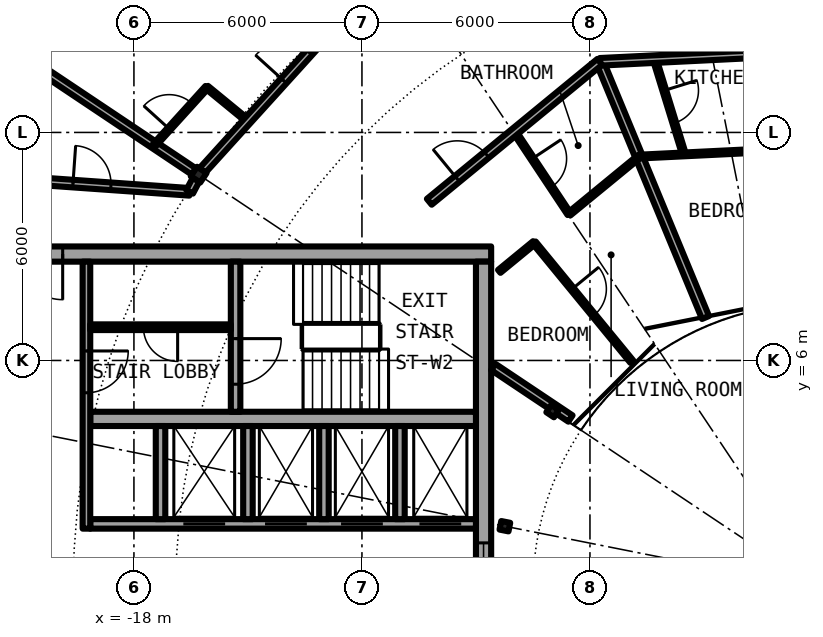
"""IFC4 building model, lengths in metres.
Left out: names, types, materials, properties, quantities, classifications, styles, units other than length and angle.
Written with IfcOpenShell. Run it as: python <this file> out.ifc"""

import sys

from ifc_helpers import new_model, si_unit, direction, frame, frame_2d, origin, origin_2d, place, context, subcontext, project, spatial, rectangle, i_section, extrude, element, fill, save


model = new_model("IFC4")
c1 = context("Model", 3, precision=1e-05, world=origin(), true_north=direction((0.0, 1.0)))
c2 = subcontext(c1, "Body", "Model", "MODEL_VIEW")
j1 = project(units=[si_unit("LENGTHUNIT", "METRE"), si_unit("PLANEANGLEUNIT", "RADIAN")], contexts=[c1])
p1 = place(None, origin())
s1 = spatial("IfcSite", under=j1, at=p1, CompositionType="ELEMENT")
p2 = place(p1, origin())
s2 = spatial("IfcBuilding", under=s1, at=p2, CompositionType="ELEMENT")
p3 = place(p2, frame((0.0, 0.0, 237.1)))
s3 = spatial("IfcBuildingStorey", under=s2, at=p3, CompositionType="ELEMENT", Elevation=237.1)
p4 = place(p3, frame((-16.297, 10.889, 0.0), z_axis=(0.0, 0.0, 1.0), x_axis=(-0.831469612303, 0.55557023302, 0.0)))
e1 = element("IfcColumn", 1, at=p4, inside=s3, PredefinedType="COLUMN", context=c2, shape_type="SweptSolid", body=[
    extrude(i_section(OverallWidth=0.3, OverallDepth=0.3, WebThickness=0.011, FlangeThickness=0.019, FilletRadius=0.027, at=origin_2d()), origin(), (0.0, 0.0, 1.0), 3.05),
])
for number, where, z_axis, x_axis in (
    (2, (-6.984, 4.667, 0.0), (0.0, 0.0, 1.0), (-0.831, 0.556, 0.0)),
    (3, (-8.239, 1.639, 0.0), (0.0, 0.0, 1.0), (-0.981, 0.195, 0.0)),
):
    element("IfcColumn", number, at=place(p3, frame(where, z_axis=z_axis, x_axis=x_axis)), inside=s3, PredefinedType="COLUMN", context=c2, shape_type="SweptSolid", body=[
        extrude(i_section(OverallWidth=0.24, OverallDepth=0.23, WebThickness=0.008, FlangeThickness=0.012, FilletRadius=0.021, at=origin_2d()), origin(), (0.0, 0.0, 1.0), 3.05),
    ])
p5 = place(p3, frame((-8.6, 8.8, 0.0), z_axis=(0.0, 0.0, 1.0), x_axis=(-1.0, 0.0, 0.0)))
e4 = element("IfcWall", 4, at=p5, inside=s3, PredefinedType="SHEAR", context=c2, shape_type="SweptSolid", body=[
    extrude(rectangle(XDim=13.4, YDim=0.4, at=frame_2d((6.7, 0.0))), origin(), (0.0, 0.0, 1.0), 3.05),
])
p6 = place(p5, frame((11.275, 0.0, 0.0)))
e5 = element("IfcOpeningElement", 5, at=p6, cuts=e4, PredefinedType="OPENING", context=c2, shape_type="SweptSolid", body=[
    extrude(rectangle(XDim=1.2, YDim=2.3, at=frame_2d((0.6, 1.15))), frame((0.0, 0.21, 0.0), z_axis=(0.0, -1.0, 0.0), x_axis=(1.0, 0.0, 0.0)), (0.0, 0.0, 1.0), 0.42),
])
p7 = place(p3, frame((-8.8, 8.6, 0.0), z_axis=(0.0, 0.0, 1.0), x_axis=(0.0, -1.0, 0.0)))
e6 = element("IfcWall", 6, at=p7, inside=s3, PredefinedType="SHEAR", context=c2, shape_type="SweptSolid", body=[
    extrude(rectangle(XDim=17.2, YDim=0.4, at=frame_2d((8.6, 0.0))), origin(), (0.0, 0.0, 1.0), 3.05),
])
p8 = place(p7, frame((7.4, 0.0, 0.1)))
e7 = element("IfcOpeningElement", 7, at=p8, cuts=e6, PredefinedType="OPENING", context=c2, shape_type="SweptSolid", body=[
    extrude(rectangle(XDim=2.4, YDim=2.2, at=frame_2d((1.2, 1.1))), frame((0.0, 0.21, 0.0), z_axis=(0.0, -1.0, 0.0), x_axis=(1.0, 0.0, 0.0)), (0.0, 0.0, 1.0), 0.42),
])
p9 = place(p3, frame((-9.0, 1.7, 0.0), z_axis=(0.0, 0.0, 1.0), x_axis=(-1.0, 0.0, 0.0)))
e8 = element("IfcWall", 8, at=p9, inside=s3, PredefinedType="SHEAR", context=c2, shape_type="SweptSolid", body=[
    extrude(rectangle(XDim=10.15, YDim=0.25, at=frame_2d((5.075, 0.0))), origin(), (0.0, 0.0, 1.0), 3.05),
])
p10 = place(p9, frame((0.387, 0.0, 0.0)))
e9 = element("IfcOpeningElement", 9, at=p10, cuts=e8, PredefinedType="OPENING", context=c2, shape_type="SweptSolid", body=[
    extrude(rectangle(XDim=1.1, YDim=2.3, at=frame_2d((0.55, 1.15))), frame((0.0, 0.135, 0.0), z_axis=(0.0, -1.0, 0.0), x_axis=(1.0, 0.0, 0.0)), (0.0, 0.0, 1.0), 0.27),
])
p11 = place(p9, frame((2.45, 0.0, 0.0)))
e10 = element("IfcOpeningElement", 10, at=p11, cuts=e8, PredefinedType="OPENING", context=c2, shape_type="SweptSolid", body=[
    extrude(rectangle(XDim=1.1, YDim=2.3, at=frame_2d((0.55, 1.15))), frame((0.0, 0.135, 0.0), z_axis=(0.0, -1.0, 0.0), x_axis=(1.0, 0.0, 0.0)), (0.0, 0.0, 1.0), 0.27),
])
p12 = place(p9, frame((4.45, 0.0, 0.0)))
e11 = element("IfcOpeningElement", 11, at=p12, cuts=e8, PredefinedType="OPENING", context=c2, shape_type="SweptSolid", body=[
    extrude(rectangle(XDim=1.1, YDim=2.3, at=frame_2d((0.55, 1.15))), frame((0.0, 0.135, 0.0), z_axis=(0.0, -1.0, 0.0), x_axis=(1.0, 0.0, 0.0)), (0.0, 0.0, 1.0), 0.27),
])
p13 = place(p9, frame((6.6, 0.0, 0.0)))
e12 = element("IfcOpeningElement", 12, at=p13, cuts=e8, PredefinedType="OPENING", context=c2, shape_type="SweptSolid", body=[
    extrude(rectangle(XDim=1.1, YDim=2.3, at=frame_2d((0.55, 1.15))), frame((0.0, 0.135, 0.0), z_axis=(0.0, -1.0, 0.0), x_axis=(1.0, 0.0, 0.0)), (0.0, 0.0, 1.0), 0.27),
])
p14 = place(p3, frame((-9.0, 4.462, 0.0), z_axis=(0.0, 0.0, 1.0), x_axis=(-1.0, 0.0, 0.0)))
e13 = element("IfcWall", 13, at=p14, inside=s3, PredefinedType="SHEAR", context=c2, shape_type="SweptSolid", body=[
    extrude(rectangle(XDim=10.15, YDim=0.375, at=frame_2d((5.075, 0.0))), origin(), (0.0, 0.0, 1.0), 3.05),
])
p15 = place(p3, frame((-15.325, 8.6, 0.0), z_axis=(0.0, 0.0, 1.0), x_axis=(0.0, -1.0, 0.0)))
e14 = element("IfcWall", 14, at=p15, inside=s3, PredefinedType="SHEAR", context=c2, shape_type="SweptSolid", body=[
    extrude(rectangle(XDim=3.95, YDim=0.25, at=frame_2d((1.975, 0.0))), origin(), (0.0, 0.0, 1.0), 3.05),
])
p16 = place(p15, frame((2.025, 0.0, 0.0)))
e15 = element("IfcOpeningElement", 15, at=p16, cuts=e14, PredefinedType="OPENING", context=c2, shape_type="SweptSolid", body=[
    extrude(rectangle(XDim=1.2, YDim=2.3, at=frame_2d((0.6, 1.15))), frame((0.0, 0.135, 0.0), z_axis=(0.0, -1.0, 0.0), x_axis=(1.0, 0.0, 0.0)), (0.0, 0.0, 1.0), 0.27),
])
for number, where, z_axis, x_axis in (
    (16, (-15.0, 1.825, 0.0), (0.0, 0.0, 1.0), (0.0, 1.0, 0.0)),
    (17, (-17.3, 1.825, 0.0), (0.0, 0.0, 1.0), (0.0, 1.0, 0.0)),
):
    element("IfcWall", number, at=place(p3, frame(where, z_axis=z_axis, x_axis=x_axis)), inside=s3, PredefinedType="SOLIDWALL", context=c2, shape_type="SweptSolid", body=[
        extrude(rectangle(XDim=2.45, YDim=0.25, at=frame_2d((1.225, 0.0))), origin(), (0.0, 0.0, 1.0), 2.7),
    ])
p17 = place(p3, frame((-19.25, 8.6, 0.0), z_axis=(0.0, 0.0, 1.0), x_axis=(0.0, -1.0, 0.0)))
e18 = element("IfcWall", 18, at=p17, inside=s3, PredefinedType="SOLIDWALL", context=c2, shape_type="SweptSolid", body=[
    extrude(rectangle(XDim=7.025, YDim=0.2, at=frame_2d((3.513, 0.0))), origin(), (0.0, 0.0, 1.0), 2.7),
])
p18 = place(p17, frame((2.35, 0.0, 0.0)))
e19 = element("IfcOpeningElement", 19, at=p18, cuts=e18, PredefinedType="OPENING", context=c2, shape_type="SweptSolid", body=[
    extrude(rectangle(XDim=1.1, YDim=2.3, at=frame_2d((0.55, 1.15))), frame((0.0, 0.11, 0.0), z_axis=(0.0, -1.0, 0.0), x_axis=(1.0, 0.0, 0.0)), (0.0, 0.0, 1.0), 0.22),
])
for number, where, z_axis, x_axis in (
    (20, (-11.0, 1.825, 0.0), (0.0, 0.0, 1.0), (0.0, 1.0, 0.0)),
    (21, (-13.0, 1.825, 0.0), (0.0, 0.0, 1.0), (0.0, 1.0, 0.0)),
):
    element("IfcWall", number, at=place(p3, frame(where, z_axis=z_axis, x_axis=x_axis)), inside=s3, PredefinedType="SOLIDWALL", context=c2, shape_type="SweptSolid", body=[
        extrude(rectangle(XDim=2.45, YDim=0.25, at=frame_2d((1.225, 0.0))), origin(), (0.0, 0.0, 1.0), 2.7),
    ])
p19 = place(p3, frame((-15.45, 6.875, 0.0), z_axis=(0.0, 0.0, 1.0), x_axis=(-1.0, 0.0, 0.0)))
e22 = element("IfcWall", 22, at=p19, inside=s3, PredefinedType="PARTITIONING", context=c2, shape_type="SweptSolid", body=[
    extrude(rectangle(XDim=3.7, YDim=0.15, at=frame_2d((1.85, 0.0))), origin(), (0.0, 0.0, 1.0), 2.7),
])
p20 = place(p19, frame((1.4, 0.0, 0.0)))
e23 = element("IfcOpeningElement", 23, at=p20, cuts=e22, PredefinedType="OPENING", context=c2, shape_type="SweptSolid", body=[
    extrude(rectangle(XDim=0.9, YDim=2.3, at=frame_2d((0.45, 1.15))), frame((0.0, 0.085, 0.0), z_axis=(0.0, -1.0, 0.0), x_axis=(1.0, 0.0, 0.0)), (0.0, 0.0, 1.0), 0.17),
])
p21 = place(p3, frame((-5.742, 13.857, 0.0), z_axis=(0.0, 0.0, 1.0), x_axis=(0.382275765368, -0.924048288355, 0.0)))
e24 = element("IfcWall", 24, at=p21, inside=s3, PredefinedType="PARTITIONING", context=c2, shape_type="SweptSolid", body=[
    extrude(rectangle(XDim=7.28, YDim=0.2, at=frame_2d((3.64, 0.0))), origin(), (0.0, 0.0, 1.0), 2.7),
])
p22 = place(p3, frame((-20.788, 13.89, 0.0), z_axis=(0.0, 0.0, 1.0), x_axis=(0.831406006746, -0.555665413668, 0.0)))
e25 = element("IfcWall", 25, at=p22, inside=s3, PredefinedType="PARTITIONING", context=c2, shape_type="SweptSolid", body=[
    extrude(rectangle(XDim=5.251, YDim=0.2, at=frame_2d((2.625, 0.0))), origin(), (0.0, 0.0, 1.0), 2.7),
])
p23 = place(p3, frame((-16.083, 13.187, 0.0), z_axis=(0.0, 0.0, 1.0), x_axis=(0.773321325714, -0.634014295735, 0.0)))
e26 = element("IfcWall", 26, at=p23, inside=s3, PredefinedType="PARTITIONING", context=c2, shape_type="SweptSolid", body=[
    extrude(rectangle(XDim=1.386, YDim=0.1, at=frame_2d((0.693, 0.0))), origin(), (0.0, 0.0, 1.0), 2.7),
])
p24 = place(p3, frame((-7.984, 12.017, 0.0), z_axis=(0.0, 0.0, 1.0), x_axis=(0.553289146762, -0.832989267683, 0.0)))
e27 = element("IfcWall", 27, at=p24, inside=s3, PredefinedType="PARTITIONING", context=c2, shape_type="SweptSolid", body=[
    extrude(rectangle(XDim=2.597, YDim=0.1, at=frame_2d((1.298, 0.0))), origin(), (0.0, 0.0, 1.0), 2.7),
])
p25 = place(p24, frame((0.848, 0.0, 0.0)))
e28 = element("IfcOpeningElement", 28, at=p25, cuts=e27, PredefinedType="OPENING", context=c2, shape_type="SweptSolid", body=[
    extrude(rectangle(XDim=0.9, YDim=2.3, at=frame_2d((0.45, 1.15))), frame((0.0, 0.06, 0.0), z_axis=(0.0, -1.0, 0.0), x_axis=(1.0, 0.0, 0.0)), (0.0, 0.0, 1.0), 0.12),
])
p26 = place(p3, frame((-7.467, 9.099, 0.0), z_axis=(0.0, 0.0, 1.0), x_axis=(0.634313840507, -0.773075644256, 0.0)))
e29 = element("IfcWall", 29, at=p26, inside=s3, PredefinedType="PARTITIONING", context=c2, shape_type="SweptSolid", body=[
    extrude(rectangle(XDim=4.05, YDim=0.1, at=frame_2d((2.025, 0.0))), origin(), (0.0, 0.0, 1.0), 2.7),
])
p27 = place(p26, frame((1.575, 0.0, 0.0)))
e30 = element("IfcOpeningElement", 30, at=p27, cuts=e29, PredefinedType="OPENING", context=c2, shape_type="SweptSolid", body=[
    extrude(rectangle(XDim=0.9, YDim=2.3, at=frame_2d((0.45, 1.15))), frame((0.0, 0.06, 0.0), z_axis=(0.0, -1.0, 0.0), x_axis=(1.0, 0.0, 0.0)), (0.0, 0.0, 1.0), 0.12),
])
p28 = place(p3, frame((-4.298, 13.929, 0.0), z_axis=(0.0, 0.0, 1.0), x_axis=(0.294733203916, -0.95557958251, 0.0)))
e31 = element("IfcWall", 31, at=p28, inside=s3, PredefinedType="PARTITIONING", context=c2, shape_type="SweptSolid", body=[
    extrude(rectangle(XDim=2.623, YDim=0.1, at=frame_2d((1.312, 0.0))), origin(), (0.0, 0.0, 1.0), 2.7),
])
p29 = place(p28, frame((0.862, 0.0, 0.0)))
e32 = element("IfcOpeningElement", 32, at=p29, cuts=e31, PredefinedType="OPENING", context=c2, shape_type="SweptSolid", body=[
    extrude(rectangle(XDim=0.9, YDim=2.3, at=frame_2d((0.45, 1.15))), frame((0.0, 0.06, 0.0), z_axis=(0.0, -1.0, 0.0), x_axis=(1.0, 0.0, 0.0)), (0.0, 0.0, 1.0), 0.12),
])
p30 = place(p3, frame((-6.513, 4.472, 0.0), z_axis=(0.0, 0.0, 1.0), x_axis=(-0.831450132577, 0.555599385382, 0.0)))
e33 = element("IfcWall", 33, at=p30, inside=s3, PredefinedType="PARTITIONING", context=c2, shape_type="SweptSolid", body=[
    extrude(rectangle(XDim=2.443, YDim=0.2, at=frame_2d((1.221, 0.0))), origin(), (0.0, 0.0, 1.0), 2.7),
])
p31 = place(p3, frame((-21.675, 10.8, 0.0), z_axis=(0.0, 0.0, 1.0), x_axis=(0.997515141784, -0.070452408845, 0.0)))
e34 = element("IfcWall", 34, at=p31, inside=s3, PredefinedType="PARTITIONING", context=c2, shape_type="SweptSolid", body=[
    extrude(rectangle(XDim=5.153, YDim=0.2, at=frame_2d((2.576, 0.0))), origin(), (0.0, 0.0, 1.0), 2.7),
])
p32 = place(p31, frame((2.076, 0.0, 0.0)))
e35 = element("IfcOpeningElement", 35, at=p32, cuts=e34, PredefinedType="OPENING", context=c2, shape_type="SweptSolid", body=[
    extrude(rectangle(XDim=1.0, YDim=2.3, at=frame_2d((0.5, 1.15))), frame((0.0, 0.11, 0.0), z_axis=(0.0, -1.0, 0.0), x_axis=(1.0, 0.0, 0.0)), (0.0, 0.0, 1.0), 0.22),
])
p33 = place(p3, frame((-4.707, 11.364, 0.0), z_axis=(0.0, 0.0, 1.0), x_axis=(0.998798028825, 0.04901527941, 0.0)))
e36 = element("IfcWall", 36, at=p33, inside=s3, PredefinedType="PARTITIONING", context=c2, shape_type="SweptSolid", body=[
    extrude(rectangle(XDim=3.551, YDim=0.1, at=frame_2d((1.776, 0.0))), origin(), (0.0, 0.0, 1.0), 2.7),
])
p34 = place(p3, frame((-8.387, 8.344, 0.0), z_axis=(0.0, 0.0, 1.0), x_axis=(0.772869802794, 0.634564628646, 0.0)))
e37 = element("IfcWall", 37, at=p34, inside=s3, PredefinedType="PARTITIONING", context=c2, shape_type="SweptSolid", body=[
    extrude(rectangle(XDim=1.192, YDim=0.1, at=frame_2d((0.596, 0.0))), origin(), (0.0, 0.0, 1.0), 2.7),
])
p35 = place(p3, frame((-6.547, 9.854, 0.0), z_axis=(0.0, 0.0, 1.0), x_axis=(0.773033390712, 0.634365333893, 0.0)))
e38 = element("IfcWall", 38, at=p35, inside=s3, PredefinedType="PARTITIONING", context=c2, shape_type="SweptSolid", body=[
    extrude(rectangle(XDim=2.38, YDim=0.1, at=frame_2d((1.19, 0.0))), origin(), (0.0, 0.0, 1.0), 2.7),
])
p36 = place(p3, frame((-5.74, 13.858, 0.0), z_axis=(0.0, 0.0, 1.0), x_axis=(0.998789706874, 0.049184565079, 0.0)))
e39 = element("IfcWall", 39, at=p36, inside=s3, PredefinedType="PARTITIONING", context=c2, shape_type="SweptSolid", body=[
    extrude(rectangle(XDim=10.106, YDim=0.2, at=frame_2d((5.053, 0.0))), origin(), (0.0, 0.0, 1.0), 2.7),
])
p37 = place(p36, frame((5.274, 0.0, 0.0)))
e40 = element("IfcOpeningElement", 40, at=p37, cuts=e39, PredefinedType="OPENING", context=c2, shape_type="SweptSolid", body=[
    extrude(rectangle(XDim=1.0, YDim=2.3, at=frame_2d((0.5, 1.15))), frame((0.0, 0.11, 0.0), z_axis=(0.0, -1.0, 0.0), x_axis=(1.0, 0.0, 0.0)), (0.0, 0.0, 1.0), 0.22),
])
p38 = place(p3, frame((-10.228, 10.175, 0.0), z_axis=(0.0, 0.0, 1.0), x_axis=(0.772989261861, 0.634419105204, 0.0)))
e41 = element("IfcWall", 41, at=p38, inside=s3, PredefinedType="PARTITIONING", context=c2, shape_type="SweptSolid", body=[
    extrude(rectangle(XDim=5.803, YDim=0.2, at=frame_2d((2.902, 0.0))), origin(), (0.0, 0.0, 1.0), 2.7),
])
p39 = place(p38, frame((0.952, 0.0, 0.0)))
e42 = element("IfcOpeningElement", 42, at=p39, cuts=e41, PredefinedType="OPENING", context=c2, shape_type="SweptSolid", body=[
    extrude(rectangle(XDim=1.0, YDim=2.3, at=frame_2d((0.5, 1.15))), frame((0.0, 0.11, 0.0), z_axis=(0.0, -1.0, 0.0), x_axis=(1.0, 0.0, 0.0)), (0.0, 0.0, 1.0), 0.22),
])
p40 = place(p3, frame((-16.195, 11.002, 0.0), z_axis=(0.0, 0.0, 1.0), x_axis=(0.671619657805, 0.740896102871, 0.0)))
e43 = element("IfcWall", 43, at=p40, inside=s3, PredefinedType="PARTITIONING", context=c2, shape_type="SweptSolid", body=[
    extrude(rectangle(XDim=5.6, YDim=0.2, at=frame_2d((2.8, 0.0))), origin(), (0.0, 0.0, 1.0), 2.45),
])
p41 = place(p40, frame((3.183, 0.0, 0.0)))
e44 = element("IfcOpeningElement", 44, at=p41, cuts=e43, PredefinedType="OPENING", context=c2, shape_type="SweptSolid", body=[
    extrude(rectangle(XDim=1.0, YDim=2.3, at=frame_2d((0.5, 1.15))), frame((0.0, 0.11, 0.0), z_axis=(0.0, -1.0, 0.0), x_axis=(1.0, 0.0, 0.0)), (0.0, 0.0, 1.0), 0.22),
])
p42 = place(p3, frame((-16.535, 10.437, 0.0), z_axis=(0.0, 0.0, 1.0), x_axis=(0.465802239822, 0.884888848035, 0.0)))
e45 = element("IfcWall", 45, at=p42, inside=s3, PredefinedType="PARTITIONING", context=c2, shape_type="SweptSolid", body=[
    extrude(rectangle(XDim=0.361, YDim=0.2, at=frame_2d((0.18, 0.0))), origin(), (0.0, 0.0, 1.0), 2.7),
])
p43 = place(p3, frame((-17.461, 11.667, 0.0), z_axis=(0.0, 0.0, 1.0), x_axis=(0.671678456097, 0.74084279818, 0.0)))
e46 = element("IfcWall", 46, at=p43, inside=s3, PredefinedType="PARTITIONING", context=c2, shape_type="SweptSolid", body=[
    extrude(rectangle(XDim=2.054, YDim=0.1, at=frame_2d((1.027, 0.0))), origin(), (0.0, 0.0, 1.0), 2.7),
])
p44 = place(p43, frame((0.577, 0.0, 0.0)))
e47 = element("IfcOpeningElement", 47, at=p44, cuts=e46, PredefinedType="OPENING", context=c2, shape_type="SweptSolid", body=[
    extrude(rectangle(XDim=0.9, YDim=2.3, at=frame_2d((0.45, 1.15))), frame((0.0, 0.06, 0.0), z_axis=(0.0, -1.0, 0.0), x_axis=(1.0, 0.0, 0.0)), (0.0, 0.0, 1.0), 0.12),
])
p45 = place(p10, origin())
e48 = element("IfcDoor", 48, at=p45, inside=s3, OperationType="DOUBLE_DOOR_SLIDING", PredefinedType="DOOR", context=c2, shape_type="SweptSolid", body=[
    extrude(rectangle(XDim=1.1, YDim=2.3, at=frame_2d((0.55, 1.15))), frame((0.0, 0.025, 0.0), z_axis=(0.0, -1.0, 0.0), x_axis=(1.0, 0.0, 0.0)), (0.0, 0.0, 1.0), 0.05),
])
fill(e9, e48)
p46 = place(p11, origin())
e49 = element("IfcDoor", 49, at=p46, inside=s3, OperationType="DOUBLE_DOOR_SLIDING", PredefinedType="DOOR", context=c2, shape_type="SweptSolid", body=[
    extrude(rectangle(XDim=1.1, YDim=2.3, at=frame_2d((0.55, 1.15))), frame((0.0, 0.025, 0.0), z_axis=(0.0, -1.0, 0.0), x_axis=(1.0, 0.0, 0.0)), (0.0, 0.0, 1.0), 0.05),
])
fill(e10, e49)
p47 = place(p12, origin())
e50 = element("IfcDoor", 50, at=p47, inside=s3, OperationType="DOUBLE_DOOR_SLIDING", PredefinedType="DOOR", context=c2, shape_type="SweptSolid", body=[
    extrude(rectangle(XDim=1.1, YDim=2.3, at=frame_2d((0.55, 1.15))), frame((0.0, 0.025, 0.0), z_axis=(0.0, -1.0, 0.0), x_axis=(1.0, 0.0, 0.0)), (0.0, 0.0, 1.0), 0.05),
])
fill(e11, e50)
p48 = place(p13, origin())
e51 = element("IfcDoor", 51, at=p48, inside=s3, OperationType="DOUBLE_DOOR_SLIDING", PredefinedType="DOOR", context=c2, shape_type="SweptSolid", body=[
    extrude(rectangle(XDim=1.1, YDim=2.3, at=frame_2d((0.55, 1.15))), frame((0.0, 0.025, 0.0), z_axis=(0.0, -1.0, 0.0), x_axis=(1.0, 0.0, 0.0)), (0.0, 0.0, 1.0), 0.05),
])
fill(e12, e51)
p49 = place(p20, origin())
e52 = element("IfcDoor", 52, at=p49, inside=s3, OperationType="SINGLE_SWING_LEFT", PredefinedType="DOOR", context=c2, shape_type="SweptSolid", body=[
    extrude(rectangle(XDim=0.9, YDim=2.3, at=frame_2d((0.45, 1.15))), frame((0.0, 0.025, 0.0), z_axis=(0.0, -1.0, 0.0), x_axis=(1.0, 0.0, 0.0)), (0.0, 0.0, 1.0), 0.05),
])
fill(e23, e52)
p50 = place(p16, origin())
e53 = element("IfcDoor", 53, at=p50, inside=s3, OperationType="SINGLE_SWING_LEFT", PredefinedType="DOOR", context=c2, shape_type="SweptSolid", body=[
    extrude(rectangle(XDim=1.2, YDim=2.3, at=frame_2d((0.6, 1.15))), frame((0.0, 0.025, 0.0), z_axis=(0.0, -1.0, 0.0), x_axis=(1.0, 0.0, 0.0)), (0.0, 0.0, 1.0), 0.05),
])
fill(e15, e53)
p51 = place(p18, origin())
e54 = element("IfcDoor", 54, at=p51, inside=s3, OperationType="SINGLE_SWING_RIGHT", PredefinedType="DOOR", context=c2, shape_type="SweptSolid", body=[
    extrude(rectangle(XDim=1.1, YDim=2.3, at=frame_2d((0.55, 1.15))), frame((0.0, 0.025, 0.0), z_axis=(0.0, -1.0, 0.0), x_axis=(1.0, 0.0, 0.0)), (0.0, 0.0, 1.0), 0.05),
])
fill(e19, e54)
p52 = place(p6, origin())
e55 = element("IfcDoor", 55, at=p52, inside=s3, OperationType="SINGLE_SWING_LEFT", PredefinedType="DOOR", context=c2, shape_type="SweptSolid", body=[
    extrude(rectangle(XDim=1.2, YDim=2.3, at=frame_2d((0.6, 1.15))), frame((0.0, 0.025, 0.0), z_axis=(0.0, -1.0, 0.0), x_axis=(1.0, 0.0, 0.0)), (0.0, 0.0, 1.0), 0.05),
])
fill(e5, e55)
p53 = place(p8, origin())
e56 = element("IfcWindow", 56, at=p53, inside=s3, PartitioningType="SINGLE_PANEL", PredefinedType="WINDOW", context=c2, shape_type="SweptSolid", body=[
    extrude(rectangle(XDim=2.4, YDim=2.2, at=frame_2d((1.2, 1.1))), frame((0.0, 0.03, 0.0), z_axis=(0.0, -1.0, 0.0), x_axis=(1.0, 0.0, 0.0)), (0.0, 0.0, 1.0), 0.06),
])
fill(e7, e56)
p54 = place(p41, origin())
e57 = element("IfcDoor", 57, at=p54, inside=s3, OperationType="SINGLE_SWING_RIGHT", PredefinedType="DOOR", context=c2, shape_type="SweptSolid", body=[
    extrude(rectangle(XDim=1.0, YDim=2.3, at=frame_2d((0.5, 1.15))), frame((0.0, 0.025, 0.0), z_axis=(0.0, -1.0, 0.0), x_axis=(1.0, 0.0, 0.0)), (0.0, 0.0, 1.0), 0.05),
])
fill(e44, e57)
p55 = place(p44, origin())
e58 = element("IfcDoor", 58, at=p55, inside=s3, OperationType="SINGLE_SWING_LEFT", PredefinedType="DOOR", context=c2, shape_type="SweptSolid", body=[
    extrude(rectangle(XDim=0.9, YDim=2.3, at=frame_2d((0.45, 1.15))), frame((0.0, 0.025, 0.0), z_axis=(0.0, -1.0, 0.0), x_axis=(1.0, 0.0, 0.0)), (0.0, 0.0, 1.0), 0.05),
])
fill(e47, e58)
p56 = place(p29, origin())
e59 = element("IfcDoor", 59, at=p56, inside=s3, OperationType="SINGLE_SWING_LEFT", PredefinedType="DOOR", context=c2, shape_type="SweptSolid", body=[
    extrude(rectangle(XDim=0.9, YDim=2.3, at=frame_2d((0.45, 1.15))), frame((0.0, 0.025, 0.0), z_axis=(0.0, -1.0, 0.0), x_axis=(1.0, 0.0, 0.0)), (0.0, 0.0, 1.0), 0.05),
])
fill(e32, e59)
p57 = place(p39, origin())
e60 = element("IfcDoor", 60, at=p57, inside=s3, OperationType="SINGLE_SWING_LEFT", PredefinedType="DOOR", context=c2, shape_type="SweptSolid", body=[
    extrude(rectangle(XDim=1.0, YDim=2.3, at=frame_2d((0.5, 1.15))), frame((0.0, 0.025, 0.0), z_axis=(0.0, -1.0, 0.0), x_axis=(1.0, 0.0, 0.0)), (0.0, 0.0, 1.0), 0.05),
])
fill(e42, e60)
p58 = place(p25, origin())
e61 = element("IfcDoor", 61, at=p58, inside=s3, OperationType="SINGLE_SWING_RIGHT", PredefinedType="DOOR", context=c2, shape_type="SweptSolid", body=[
    extrude(rectangle(XDim=0.9, YDim=2.3, at=frame_2d((0.45, 1.15))), frame((0.0, 0.025, 0.0), z_axis=(0.0, -1.0, 0.0), x_axis=(1.0, 0.0, 0.0)), (0.0, 0.0, 1.0), 0.05),
])
fill(e28, e61)
p59 = place(p27, origin())
e62 = element("IfcDoor", 62, at=p59, inside=s3, OperationType="SINGLE_SWING_RIGHT", PredefinedType="DOOR", context=c2, shape_type="SweptSolid", body=[
    extrude(rectangle(XDim=0.9, YDim=2.3, at=frame_2d((0.45, 1.15))), frame((0.0, 0.025, 0.0), z_axis=(0.0, -1.0, 0.0), x_axis=(1.0, 0.0, 0.0)), (0.0, 0.0, 1.0), 0.05),
])
fill(e30, e62)
p60 = place(p32, origin())
e63 = element("IfcDoor", 63, at=p60, inside=s3, OperationType="SINGLE_SWING_RIGHT", PredefinedType="DOOR", context=c2, shape_type="SweptSolid", body=[
    extrude(rectangle(XDim=1.0, YDim=2.3, at=frame_2d((0.5, 1.15))), frame((0.0, 0.025, 0.0), z_axis=(0.0, -1.0, 0.0), x_axis=(1.0, 0.0, 0.0)), (0.0, 0.0, 1.0), 0.05),
])
fill(e35, e63)
save(model, sys.argv[1])
